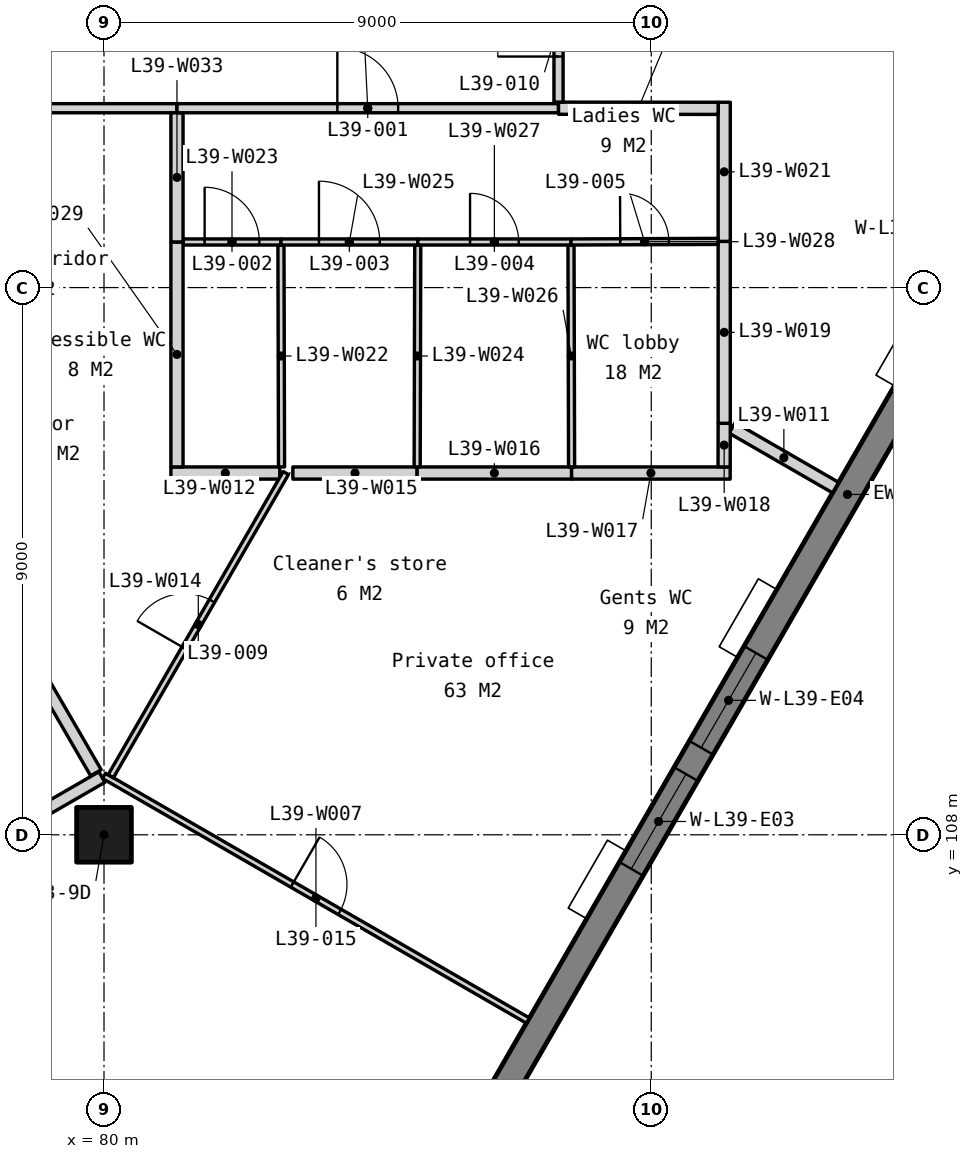
"""IFC4 building model, lengths in metres.
Left out: names, types, materials, properties, quantities, classifications, styles, units other than length and angle.
Written with IfcOpenShell. Run it as: python <this file> out.ifc"""

import sys

from ifc_helpers import new_model, si_unit, direction, frame, frame_2d, origin, origin_2d, place, context, subcontext, project, spatial, polyline, rectangle, outline, extrude, element, fill, save


model = new_model("IFC4")
c1 = context("Model", 3, precision=1e-05, world=origin(), true_north=direction((0.0, 1.0)))
c2 = subcontext(c1, "Body", "Model", "MODEL_VIEW")
j1 = project(units=[si_unit("LENGTHUNIT", "METRE"), si_unit("PLANEANGLEUNIT", "RADIAN")], contexts=[c1])
p1 = place(None, origin())
s1 = spatial("IfcSite", under=j1, at=p1, CompositionType="ELEMENT")
p2 = place(p1, origin())
s2 = spatial("IfcBuilding", under=s1, at=p2, CompositionType="ELEMENT")
p3 = place(p2, frame((0.0, 0.0, 155.9)))
s3 = spatial("IfcBuildingStorey", under=s2, at=p3, CompositionType="ELEMENT", Elevation=155.9)
p4 = place(p3, frame((80.0, 108.0, 0.0), z_axis=(0.0, 0.0, 1.0), x_axis=(1.0, 0.0, 0.0)))
e1 = element("IfcColumn", 1, at=p4, inside=s3, PredefinedType="COLUMN", context=c2, shape_type="SweptSolid", body=[
    extrude(rectangle(XDim=0.9, YDim=0.9, at=origin_2d()), origin(), (0.0, 0.0, 1.0), 3.9),
])
p5 = place(p3, frame((82.105, 96.067, -0.15), z_axis=(0.0, 0.0, 1.0), x_axis=(0.499997369791, 0.866026922331, 0.0)))
e2 = element("IfcWall", 2, at=p5, inside=s3, PredefinedType="SOLIDWALL", context=c2, shape_type="SweptSolid", body=[
    extrude(outline(polyline([(40.486, 0.0), (40.486, 3.9), (0.0, 3.9), (0.0, 0.0), (40.486, 0.0)])), frame((0.0, 0.225, 0.0), z_axis=(0.0, -1.0, 0.0), x_axis=(1.0, 0.0, 0.0)), (0.0, 0.0, 1.0), 0.45),
])
p6 = place(p5, frame((3.011, 0.0, 0.95)))
e3 = element("IfcOpeningElement", 3, at=p6, cuts=e2, PredefinedType="OPENING", context=c2, shape_type="SweptSolid", body=[
    extrude(rectangle(XDim=1.8, YDim=2.2, at=frame_2d((0.9, 1.1))), frame((0.0, 0.235, 0.0), z_axis=(0.0, -1.0, 0.0), x_axis=(1.0, 0.0, 0.0)), (0.0, 0.0, 1.0), 0.47),
])
p7 = place(p5, frame((5.311, 0.0, 0.95)))
e4 = element("IfcOpeningElement", 4, at=p7, cuts=e2, PredefinedType="OPENING", context=c2, shape_type="SweptSolid", body=[
    extrude(rectangle(XDim=1.8, YDim=2.2, at=frame_2d((0.9, 1.1))), frame((0.0, 0.235, 0.0), z_axis=(0.0, -1.0, 0.0), x_axis=(1.0, 0.0, 0.0)), (0.0, 0.0, 1.0), 0.47),
])
p8 = place(p5, frame((13.132, 0.0, 0.95)))
e5 = element("IfcOpeningElement", 5, at=p8, cuts=e2, PredefinedType="OPENING", context=c2, shape_type="SweptSolid", body=[
    extrude(rectangle(XDim=1.8, YDim=2.2, at=frame_2d((0.9, 1.1))), frame((0.0, 0.235, 0.0), z_axis=(0.0, -1.0, 0.0), x_axis=(1.0, 0.0, 0.0)), (0.0, 0.0, 1.0), 0.47),
])
p9 = place(p5, frame((15.432, 0.0, 0.95)))
e6 = element("IfcOpeningElement", 6, at=p9, cuts=e2, PredefinedType="OPENING", context=c2, shape_type="SweptSolid", body=[
    extrude(rectangle(XDim=1.8, YDim=2.2, at=frame_2d((0.9, 1.1))), frame((0.0, 0.235, 0.0), z_axis=(0.0, -1.0, 0.0), x_axis=(1.0, 0.0, 0.0)), (0.0, 0.0, 1.0), 0.47),
])
p10 = place(p5, frame((23.254, 0.0, 0.95)))
e7 = element("IfcOpeningElement", 7, at=p10, cuts=e2, PredefinedType="OPENING", context=c2, shape_type="SweptSolid", body=[
    extrude(rectangle(XDim=1.8, YDim=2.2, at=frame_2d((0.9, 1.1))), frame((0.0, 0.235, 0.0), z_axis=(0.0, -1.0, 0.0), x_axis=(1.0, 0.0, 0.0)), (0.0, 0.0, 1.0), 0.47),
])
p11 = place(p5, frame((25.554, 0.0, 0.95)))
e8 = element("IfcOpeningElement", 8, at=p11, cuts=e2, PredefinedType="OPENING", context=c2, shape_type="SweptSolid", body=[
    extrude(rectangle(XDim=1.8, YDim=2.2, at=frame_2d((0.9, 1.1))), frame((0.0, 0.235, 0.0), z_axis=(0.0, -1.0, 0.0), x_axis=(1.0, 0.0, 0.0)), (0.0, 0.0, 1.0), 0.47),
])
p12 = place(p5, frame((33.375, 0.0, 0.95)))
e9 = element("IfcOpeningElement", 9, at=p12, cuts=e2, PredefinedType="OPENING", context=c2, shape_type="SweptSolid", body=[
    extrude(rectangle(XDim=1.8, YDim=2.2, at=frame_2d((0.9, 1.1))), frame((0.0, 0.235, 0.0), z_axis=(0.0, -1.0, 0.0), x_axis=(1.0, 0.0, 0.0)), (0.0, 0.0, 1.0), 0.47),
])
p13 = place(p5, frame((35.675, 0.0, 0.95)))
e10 = element("IfcOpeningElement", 10, at=p13, cuts=e2, PredefinedType="OPENING", context=c2, shape_type="SweptSolid", body=[
    extrude(rectangle(XDim=1.8, YDim=2.2, at=frame_2d((0.9, 1.1))), frame((0.0, 0.235, 0.0), z_axis=(0.0, -1.0, 0.0), x_axis=(1.0, 0.0, 0.0)), (0.0, 0.0, 1.0), 0.47),
])
p14 = place(p3, frame((73.029, 104.945, 0.0), z_axis=(0.0, 0.0, 1.0), x_axis=(0.866028745538, 0.499994211868, 0.0)))
e11 = element("IfcWall", 11, at=p14, inside=s3, PredefinedType="PARTITIONING", context=c2, shape_type="SweptSolid", body=[
    extrude(rectangle(XDim=8.01, YDim=0.2, at=frame_2d((4.005, 0.0))), origin(), (0.0, 0.0, 1.0), 3.75),
])
p15 = place(p3, frame((77.384, 113.302, 0.0), z_axis=(0.0, 0.0, 1.0), x_axis=(0.501726207978, -0.865026480651, 0.0)))
e12 = element("IfcWall", 12, at=p15, inside=s3, PredefinedType="PARTITIONING", context=c2, shape_type="SweptSolid", body=[
    extrude(rectangle(XDim=4.951, YDim=0.2, at=frame_2d((2.475, 0.0))), origin(), (0.0, 0.0, 1.0), 3.75),
])
p16 = place(p3, frame((80.0, 108.969, 0.0), z_axis=(0.0, 0.0, 1.0), x_axis=(0.86602648383, -0.499998129301, 0.0)))
e13 = element("IfcWall", 13, at=p16, inside=s3, PredefinedType="PARTITIONING", context=c2, shape_type="SweptSolid", body=[
    extrude(rectangle(XDim=8.049, YDim=0.1, at=frame_2d((4.025, 0.0))), origin(), (0.0, 0.0, 1.0), 3.75),
])
p17 = place(p16, frame((3.575, 0.0, 0.0)))
e14 = element("IfcOpeningElement", 14, at=p17, cuts=e13, PredefinedType="OPENING", context=c2, shape_type="SweptSolid", body=[
    extrude(rectangle(XDim=0.9, YDim=2.1, at=frame_2d((0.45, 1.05))), frame((0.0, 0.06, 0.0), z_axis=(0.0, -1.0, 0.0), x_axis=(1.0, 0.0, 0.0)), (0.0, 0.0, 1.0), 0.12),
])
p18 = place(p3, frame((90.33, 114.693, 0.0), z_axis=(0.0, 0.0, 1.0), x_axis=(0.866009734793, -0.500027138508, 0.0)))
e15 = element("IfcWall", 15, at=p18, inside=s3, PredefinedType="PARTITIONING", context=c2, shape_type="SweptSolid", body=[
    extrude(rectangle(XDim=1.965, YDim=0.2, at=frame_2d((0.983, 0.0))), origin(), (0.0, 0.0, 1.0), 3.75),
])
p19 = place(p3, frame((81.1, 113.95, 0.0), z_axis=(0.0, 0.0, 1.0), x_axis=(1.0, 0.0, 0.0)))
e16 = element("IfcWall", 16, at=p19, inside=s3, PredefinedType="PARTITIONING", context=c2, shape_type="SweptSolid", body=[
    extrude(rectangle(XDim=1.79, YDim=0.2, at=frame_2d((0.895, 0.0))), origin(), (0.0, 0.0, 1.0), 3.75),
])
p20 = place(p3, frame((80.111, 108.963, 0.0), z_axis=(0.0, 0.0, 1.0), x_axis=(0.500033177651, 0.866006247812, 0.0)))
e17 = element("IfcWall", 17, at=p20, inside=s3, PredefinedType="PARTITIONING", context=c2, shape_type="SweptSolid", body=[
    extrude(rectangle(XDim=5.758, YDim=0.1, at=frame_2d((2.879, 0.0))), origin(), (0.0, 0.0, 1.0), 3.75),
])
p21 = place(p20, frame((2.429, 0.0, 0.0)))
e18 = element("IfcOpeningElement", 18, at=p21, cuts=e17, PredefinedType="OPENING", context=c2, shape_type="SweptSolid", body=[
    extrude(rectangle(XDim=0.9, YDim=2.1, at=frame_2d((0.45, 1.05))), frame((0.0, 0.06, 0.0), z_axis=(0.0, -1.0, 0.0), x_axis=(1.0, 0.0, 0.0)), (0.0, 0.0, 1.0), 0.12),
])
p22 = place(p3, frame((83.106, 113.95, 0.0), z_axis=(0.0, 0.0, 1.0), x_axis=(1.0, 0.0, 0.0)))
e19 = element("IfcWall", 19, at=p22, inside=s3, PredefinedType="PARTITIONING", context=c2, shape_type="SweptSolid", body=[
    extrude(rectangle(XDim=2.044, YDim=0.2, at=frame_2d((1.022, 0.0))), origin(), (0.0, 0.0, 1.0), 3.75),
])
p23 = place(p3, frame((85.15, 113.95, 0.0), z_axis=(0.0, 0.0, 1.0), x_axis=(1.0, 0.0, 0.0)))
e20 = element("IfcWall", 20, at=p23, inside=s3, PredefinedType="PARTITIONING", context=c2, shape_type="SweptSolid", body=[
    extrude(rectangle(XDim=2.54, YDim=0.2, at=frame_2d((1.27, 0.0))), origin(), (0.0, 0.0, 1.0), 3.75),
])
p24 = place(p3, frame((87.69, 113.95, 0.0), z_axis=(0.0, 0.0, 1.0), x_axis=(1.0, 0.0, 0.0)))
e21 = element("IfcWall", 21, at=p24, inside=s3, PredefinedType="PARTITIONING", context=c2, shape_type="SweptSolid", body=[
    extrude(rectangle(XDim=2.608, YDim=0.2, at=frame_2d((1.304, 0.0))), origin(), (0.0, 0.0, 1.0), 3.75),
])
p25 = place(p3, frame((90.198, 114.05, 0.0), z_axis=(0.0, 0.0, 1.0), x_axis=(0.002380945632, 0.999997165545, 0.0)))
e22 = element("IfcWall", 22, at=p25, inside=s3, PredefinedType="PARTITIONING", context=c2, shape_type="SweptSolid", body=[
    extrude(rectangle(XDim=0.718, YDim=0.2, at=frame_2d((0.359, 0.0))), origin(), (0.0, 0.0, 1.0), 3.75),
])
p26 = place(p3, frame((90.2, 114.768, 0.0), z_axis=(0.0, 0.0, 1.0), x_axis=(0.0, 1.0, 0.0)))
e23 = element("IfcWall", 23, at=p26, inside=s3, PredefinedType="PARTITIONING", context=c2, shape_type="SweptSolid", body=[
    extrude(rectangle(XDim=2.992, YDim=0.2, at=frame_2d((1.496, 0.0))), origin(), (0.0, 0.0, 1.0), 3.75),
])
p27 = place(p3, frame((90.2, 117.76, 0.0), z_axis=(0.0, 0.0, 1.0), x_axis=(0.0, 1.0, 0.0)))
e24 = element("IfcWall", 24, at=p27, inside=s3, PredefinedType="PARTITIONING", context=c2, shape_type="SweptSolid", body=[
    extrude(rectangle(XDim=2.288, YDim=0.2, at=frame_2d((1.144, 0.0))), origin(), (0.0, 0.0, 1.0), 3.75),
])
p28 = place(p3, frame((82.92, 114.05, 0.0), z_axis=(0.0, 0.0, 1.0), x_axis=(-0.002608686776, 0.999996597371, 0.0)))
e25 = element("IfcWall", 25, at=p28, inside=s3, PredefinedType="PARTITIONING", context=c2, shape_type="SweptSolid", body=[
    extrude(rectangle(XDim=3.65, YDim=0.1, at=frame_2d((1.825, 0.0))), origin(), (0.0, 0.0, 1.0), 3.75),
])
p29 = place(p3, frame((81.3, 117.75, 0.0), z_axis=(0.0, 0.0, 1.0), x_axis=(1.0, 0.0, 0.0)))
e26 = element("IfcWall", 26, at=p29, inside=s3, PredefinedType="PARTITIONING", context=c2, shape_type="SweptSolid", body=[
    extrude(rectangle(XDim=1.61, YDim=0.1, at=frame_2d((0.805, 0.0))), origin(), (0.0, 0.0, 1.0), 3.75),
])
p30 = place(p29, frame((0.355, 0.0, 0.0)))
e27 = element("IfcOpeningElement", 27, at=p30, cuts=e26, PredefinedType="OPENING", context=c2, shape_type="SweptSolid", body=[
    extrude(rectangle(XDim=0.9, YDim=2.1, at=frame_2d((0.45, 1.05))), frame((0.0, 0.06, 0.0), z_axis=(0.0, -1.0, 0.0), x_axis=(1.0, 0.0, 0.0)), (0.0, 0.0, 1.0), 0.12),
])
p31 = place(p3, frame((85.15, 114.05, 0.0), z_axis=(0.0, 0.0, 1.0), x_axis=(0.002675575707, 0.999996420641, 0.0)))
e28 = element("IfcWall", 28, at=p31, inside=s3, PredefinedType="PARTITIONING", context=c2, shape_type="SweptSolid", body=[
    extrude(rectangle(XDim=3.65, YDim=0.1, at=frame_2d((1.825, 0.0))), origin(), (0.0, 0.0, 1.0), 3.75),
])
p32 = place(p3, frame((82.91, 117.75, 0.0), z_axis=(0.0, 0.0, 1.0), x_axis=(1.0, 0.0, 0.0)))
e29 = element("IfcWall", 29, at=p32, inside=s3, PredefinedType="PARTITIONING", context=c2, shape_type="SweptSolid", body=[
    extrude(rectangle(XDim=2.25, YDim=0.1, at=frame_2d((1.125, 0.0))), origin(), (0.0, 0.0, 1.0), 3.75),
])
p33 = place(p32, frame((0.625, 0.0, 0.0)))
e30 = element("IfcOpeningElement", 30, at=p33, cuts=e29, PredefinedType="OPENING", context=c2, shape_type="SweptSolid", body=[
    extrude(rectangle(XDim=1.0, YDim=2.1, at=frame_2d((0.5, 1.05))), frame((0.0, 0.06, 0.0), z_axis=(0.0, -1.0, 0.0), x_axis=(1.0, 0.0, 0.0)), (0.0, 0.0, 1.0), 0.12),
])
p34 = place(p3, frame((87.69, 114.05, 0.0), z_axis=(0.0, 0.0, 1.0), x_axis=(-0.002608686776, 0.999996597371, 0.0)))
e31 = element("IfcWall", 31, at=p34, inside=s3, PredefinedType="PARTITIONING", context=c2, shape_type="SweptSolid", body=[
    extrude(rectangle(XDim=3.65, YDim=0.1, at=frame_2d((1.825, 0.0))), origin(), (0.0, 0.0, 1.0), 3.75),
])
p35 = place(p3, frame((85.16, 117.75, 0.0), z_axis=(0.0, 0.0, 1.0), x_axis=(1.0, 0.0, 0.0)))
e32 = element("IfcWall", 32, at=p35, inside=s3, PredefinedType="PARTITIONING", context=c2, shape_type="SweptSolid", body=[
    extrude(rectangle(XDim=2.52, YDim=0.1, at=frame_2d((1.26, 0.0))), origin(), (0.0, 0.0, 1.0), 3.75),
])
p36 = place(p35, frame((0.86, 0.0, 0.0)))
e33 = element("IfcOpeningElement", 33, at=p36, cuts=e32, PredefinedType="OPENING", context=c2, shape_type="SweptSolid", body=[
    extrude(rectangle(XDim=0.8, YDim=2.1, at=frame_2d((0.4, 1.05))), frame((0.0, 0.06, 0.0), z_axis=(0.0, -1.0, 0.0), x_axis=(1.0, 0.0, 0.0)), (0.0, 0.0, 1.0), 0.12),
])
p37 = place(p3, frame((87.68, 117.75, 0.0), z_axis=(0.0, 0.0, 1.0), x_axis=(0.999992261016, 0.003934197335, 0.0)))
e34 = element("IfcWall", 34, at=p37, inside=s3, PredefinedType="PARTITIONING", context=c2, shape_type="SweptSolid", body=[
    extrude(rectangle(XDim=2.42, YDim=0.1, at=frame_2d((1.21, 0.0))), origin(), (0.0, 0.0, 1.0), 3.75),
])
p38 = place(p37, frame((0.81, 0.0, 0.0)))
e35 = element("IfcOpeningElement", 35, at=p38, cuts=e34, PredefinedType="OPENING", context=c2, shape_type="SweptSolid", body=[
    extrude(rectangle(XDim=0.8, YDim=2.1, at=frame_2d((0.4, 1.05))), frame((0.0, 0.06, 0.0), z_axis=(0.0, -1.0, 0.0), x_axis=(1.0, 0.0, 0.0)), (0.0, 0.0, 1.0), 0.12),
])
p39 = place(p3, frame((81.2, 114.05, 0.0), z_axis=(0.0, 0.0, 1.0), x_axis=(0.0, 1.0, 0.0)))
e36 = element("IfcWall", 36, at=p39, inside=s3, PredefinedType="PARTITIONING", context=c2, shape_type="SweptSolid", body=[
    extrude(rectangle(XDim=3.7, YDim=0.2, at=frame_2d((1.85, 0.0))), origin(), (0.0, 0.0, 1.0), 3.75),
])
p40 = place(p3, frame((73.545, 119.95, 0.0), z_axis=(0.0, 0.0, 1.0), x_axis=(1.0, 0.0, 0.0)))
e37 = element("IfcWall", 37, at=p40, inside=s3, PredefinedType="PARTITIONING", context=c2, shape_type="SweptSolid", body=[
    extrude(rectangle(XDim=7.655, YDim=0.15, at=frame_2d((3.827, 0.0))), origin(), (0.0, 0.0, 1.0), 3.75),
])
p41 = place(p40, frame((2.927, 0.0, 0.0)))
e38 = element("IfcOpeningElement", 38, at=p41, cuts=e37, PredefinedType="OPENING", context=c2, shape_type="SweptSolid", body=[
    extrude(rectangle(XDim=1.8, YDim=2.1, at=frame_2d((0.9, 1.05))), frame((0.0, 0.085, 0.0), z_axis=(0.0, -1.0, 0.0), x_axis=(1.0, 0.0, 0.0)), (0.0, 0.0, 1.0), 0.17),
])
p42 = place(p3, frame((81.2, 117.75, 0.0), z_axis=(0.0, 0.0, 1.0), x_axis=(0.0, 1.0, 0.0)))
e39 = element("IfcWall", 39, at=p42, inside=s3, PredefinedType="PARTITIONING", context=c2, shape_type="SweptSolid", body=[
    extrude(rectangle(XDim=2.125, YDim=0.2, at=frame_2d((1.062, 0.0))), origin(), (0.0, 0.0, 1.0), 3.75),
])
p43 = place(p3, frame((81.2, 119.95, 0.0), z_axis=(0.0, 0.0, 1.0), x_axis=(1.0, 0.0, 0.0)))
e40 = element("IfcWall", 40, at=p43, inside=s3, PredefinedType="PARTITIONING", context=c2, shape_type="SweptSolid", body=[
    extrude(rectangle(XDim=6.275, YDim=0.15, at=frame_2d((3.138, 0.0))), origin(), (0.0, 0.0, 1.0), 3.75),
])
p44 = place(p43, frame((2.637, 0.0, 0.0)))
e41 = element("IfcOpeningElement", 41, at=p44, cuts=e40, PredefinedType="OPENING", context=c2, shape_type="SweptSolid", body=[
    extrude(rectangle(XDim=1.0, YDim=2.1, at=frame_2d((0.5, 1.05))), frame((0.0, 0.085, 0.0), z_axis=(0.0, -1.0, 0.0), x_axis=(1.0, 0.0, 0.0)), (0.0, 0.0, 1.0), 0.17),
])
p45 = place(p3, frame((87.475, 119.95, 0.0), z_axis=(0.0, 0.0, 1.0), x_axis=(0.999999723197, -0.000744047413, 0.0)))
e42 = element("IfcWall", 42, at=p45, inside=s3, PredefinedType="PARTITIONING", context=c2, shape_type="SweptSolid", body=[
    extrude(rectangle(XDim=2.625, YDim=0.2, at=frame_2d((1.312, 0.0))), origin(), (0.0, 0.0, 1.0), 3.75),
])
p46 = place(p3, frame((87.475, 120.05, 0.0), z_axis=(0.0, 0.0, 1.0), x_axis=(0.0, 1.0, 0.0)))
e43 = element("IfcWall", 43, at=p46, inside=s3, PredefinedType="PARTITIONING", context=c2, shape_type="SweptSolid", body=[
    extrude(rectangle(XDim=2.5, YDim=0.15, at=frame_2d((1.25, 0.0))), origin(), (0.0, 0.0, 1.0), 3.75),
])
p47 = place(p46, frame((0.75, 0.0, 0.0)))
e44 = element("IfcOpeningElement", 44, at=p47, cuts=e43, PredefinedType="OPENING", context=c2, shape_type="SweptSolid", body=[
    extrude(rectangle(XDim=1.0, YDim=2.1, at=frame_2d((0.5, 1.05))), frame((0.0, 0.085, 0.0), z_axis=(0.0, -1.0, 0.0), x_axis=(1.0, 0.0, 0.0)), (0.0, 0.0, 1.0), 0.17),
])
p48 = place(p8, origin())
e45 = element("IfcWindow", 45, at=p48, inside=s3, PartitioningType="SINGLE_PANEL", PredefinedType="WINDOW", context=c2, shape_type="SweptSolid", body=[
    extrude(rectangle(XDim=1.8, YDim=2.2, at=frame_2d((0.9, 1.1))), frame((0.0, 0.03, 0.0), z_axis=(0.0, -1.0, 0.0), x_axis=(1.0, 0.0, 0.0)), (0.0, 0.0, 1.0), 0.06),
])
fill(e5, e45)
p49 = place(p9, origin())
e46 = element("IfcWindow", 46, at=p49, inside=s3, PartitioningType="SINGLE_PANEL", PredefinedType="WINDOW", context=c2, shape_type="SweptSolid", body=[
    extrude(rectangle(XDim=1.8, YDim=2.2, at=frame_2d((0.9, 1.1))), frame((0.0, 0.03, 0.0), z_axis=(0.0, -1.0, 0.0), x_axis=(1.0, 0.0, 0.0)), (0.0, 0.0, 1.0), 0.06),
])
fill(e6, e46)
p50 = place(p44, origin())
e47 = element("IfcDoor", 47, at=p50, inside=s3, OperationType="SINGLE_SWING_LEFT", PredefinedType="DOOR", context=c2, shape_type="SweptSolid", body=[
    extrude(rectangle(XDim=1.0, YDim=2.1, at=frame_2d((0.5, 1.05))), frame((0.0, 0.025, 0.0), z_axis=(0.0, -1.0, 0.0), x_axis=(1.0, 0.0, 0.0)), (0.0, 0.0, 1.0), 0.05),
])
fill(e41, e47)
p51 = place(p30, origin())
e48 = element("IfcDoor", 48, at=p51, inside=s3, OperationType="SINGLE_SWING_LEFT", PredefinedType="DOOR", context=c2, shape_type="SweptSolid", body=[
    extrude(rectangle(XDim=0.9, YDim=2.1, at=frame_2d((0.45, 1.05))), frame((0.0, 0.025, 0.0), z_axis=(0.0, -1.0, 0.0), x_axis=(1.0, 0.0, 0.0)), (0.0, 0.0, 1.0), 0.05),
])
fill(e27, e48)
p52 = place(p33, origin())
e49 = element("IfcDoor", 49, at=p52, inside=s3, OperationType="SINGLE_SWING_LEFT", PredefinedType="DOOR", context=c2, shape_type="SweptSolid", body=[
    extrude(rectangle(XDim=1.0, YDim=2.1, at=frame_2d((0.5, 1.05))), frame((0.0, 0.025, 0.0), z_axis=(0.0, -1.0, 0.0), x_axis=(1.0, 0.0, 0.0)), (0.0, 0.0, 1.0), 0.05),
])
fill(e30, e49)
p53 = place(p36, origin())
e50 = element("IfcDoor", 50, at=p53, inside=s3, OperationType="SINGLE_SWING_LEFT", PredefinedType="DOOR", context=c2, shape_type="SweptSolid", body=[
    extrude(rectangle(XDim=0.8, YDim=2.1, at=frame_2d((0.4, 1.05))), frame((0.0, 0.025, 0.0), z_axis=(0.0, -1.0, 0.0), x_axis=(1.0, 0.0, 0.0)), (0.0, 0.0, 1.0), 0.05),
])
fill(e33, e50)
p54 = place(p38, origin())
e51 = element("IfcDoor", 51, at=p54, inside=s3, OperationType="SINGLE_SWING_LEFT", PredefinedType="DOOR", context=c2, shape_type="SweptSolid", body=[
    extrude(rectangle(XDim=0.8, YDim=2.1, at=frame_2d((0.4, 1.05))), frame((0.0, 0.025, 0.0), z_axis=(0.0, -1.0, 0.0), x_axis=(1.0, 0.0, 0.0)), (0.0, 0.0, 1.0), 0.05),
])
fill(e35, e51)
p55 = place(p21, origin())
e52 = element("IfcDoor", 52, at=p55, inside=s3, OperationType="SINGLE_SWING_LEFT", PredefinedType="DOOR", context=c2, shape_type="SweptSolid", body=[
    extrude(rectangle(XDim=0.9, YDim=2.1, at=frame_2d((0.45, 1.05))), frame((0.0, 0.025, 0.0), z_axis=(0.0, -1.0, 0.0), x_axis=(1.0, 0.0, 0.0)), (0.0, 0.0, 1.0), 0.05),
])
fill(e18, e52)
p56 = place(p47, origin())
e53 = element("IfcDoor", 53, at=p56, inside=s3, OperationType="SINGLE_SWING_LEFT", PredefinedType="DOOR", context=c2, shape_type="SweptSolid", body=[
    extrude(rectangle(XDim=1.0, YDim=2.1, at=frame_2d((0.5, 1.05))), frame((0.0, 0.025, 0.0), z_axis=(0.0, -1.0, 0.0), x_axis=(1.0, 0.0, 0.0)), (0.0, 0.0, 1.0), 0.05),
])
fill(e44, e53)
p57 = place(p17, origin())
e54 = element("IfcDoor", 54, at=p57, inside=s3, OperationType="SINGLE_SWING_LEFT", PredefinedType="DOOR", context=c2, shape_type="SweptSolid", body=[
    extrude(rectangle(XDim=0.9, YDim=2.1, at=frame_2d((0.45, 1.05))), frame((0.0, 0.025, 0.0), z_axis=(0.0, -1.0, 0.0), x_axis=(1.0, 0.0, 0.0)), (0.0, 0.0, 1.0), 0.05),
])
fill(e14, e54)
save(model, sys.argv[1])
